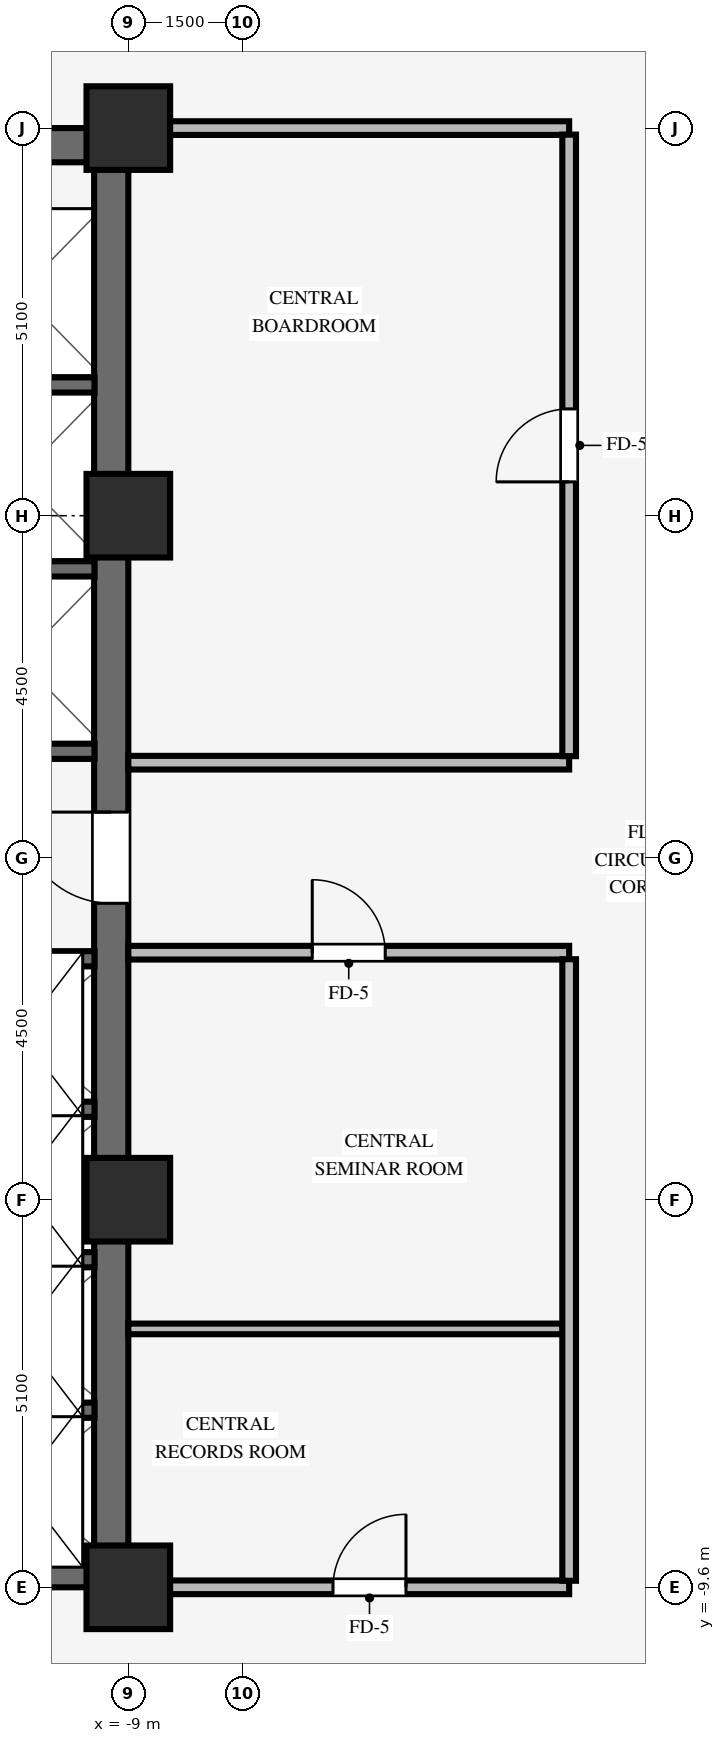
"""IFC4 building model, lengths in metres.
Left out: names, types, materials, properties, quantities, classifications, styles, units other than length and angle.
Written with IfcOpenShell. Run it as: python <this file> out.ifc"""

import sys

from ifc_helpers import new_model, si_unit, direction, frame, frame_2d, origin, origin_2d, place, context, subcontext, project, spatial, rectangle, extrude, source, transform, mapped, element, fill, save


model = new_model("IFC4")
c1 = context("Model", 3, precision=1e-05, world=origin(), true_north=direction((0.0, 1.0)))
c2 = subcontext(c1, "Body", "Model", "MODEL_VIEW")
j1 = project(units=[si_unit("LENGTHUNIT", "METRE"), si_unit("PLANEANGLEUNIT", "RADIAN")], contexts=[c1])
p1 = place(None, origin())
s1 = spatial("IfcSite", under=j1, at=p1, CompositionType="ELEMENT")
p2 = place(p1, origin())
s2 = spatial("IfcBuilding", under=s1, at=p2, CompositionType="ELEMENT")
p3 = place(p2, frame((0.0, 0.0, 56.8)))
s3 = spatial("IfcBuildingStorey", under=s2, at=p3, CompositionType="ELEMENT", Elevation=56.8)
for number, where, z_axis, x_axis in (
    (1, (-17.5, -9.375, 0.0), (0.0, 0.0, 1.0), (1.0, 0.0, 0.0)),
    (2, (-17.5, 9.375, 0.0), (0.0, 0.0, 1.0), (1.0, 0.0, 0.0)),
):
    element("IfcWall", number, at=place(p3, frame(where, z_axis=z_axis, x_axis=x_axis)), inside=s3, PredefinedType="SHEAR", context=c2, shape_type="SweptSolid", body=[
        extrude(rectangle(XDim=8.5, YDim=0.45, at=frame_2d((4.25, 0.0))), origin(), (0.0, 0.0, 1.0), 3.37),
    ])
p4 = place(p3, frame((-9.225, -9.155, 0.0), z_axis=(0.0, 0.0, 1.0), x_axis=(0.0, 1.0, 0.0)))
e3 = element("IfcWall", 3, at=p4, inside=s3, PredefinedType="SHEAR", context=c2, shape_type="SweptSolid", body=[
    extrude(rectangle(XDim=18.31, YDim=0.45, at=frame_2d((9.155, 0.0))), origin(), (0.0, 0.0, 1.0), 3.37),
])
p5 = place(p4, frame((8.555, 0.0, 0.0)))
e4 = element("IfcOpeningElement", 4, at=p5, cuts=e3, PredefinedType="OPENING", context=c2, shape_type="SweptSolid", body=[
    extrude(rectangle(XDim=1.2, YDim=2.15, at=frame_2d((0.6, 1.075))), frame((0.0, 0.235, 0.0), z_axis=(0.0, -1.0, 0.0), x_axis=(1.0, 0.0, 0.0)), (0.0, 0.0, 1.0), 0.47),
])
for number, where, z_axis, x_axis in (
    (5, (-9.0, -9.6, 0.0), (0.0, 0.0, 1.0), (1.0, 0.0, 0.0)),
    (6, (-9.0, -4.5, 0.0), (0.0, 0.0, 1.0), (1.0, 0.0, 0.0)),
    (7, (-9.0, 4.5, 0.0), (0.0, 0.0, 1.0), (1.0, 0.0, 0.0)),
    (8, (-9.0, 9.6, 0.0), (0.0, 0.0, 1.0), (1.0, 0.0, 0.0)),
):
    element("IfcColumn", number, at=place(p3, frame(where, z_axis=z_axis, x_axis=x_axis)), inside=s3, PredefinedType="COLUMN", context=c2, shape_type="SweptSolid", body=[
        extrude(rectangle(XDim=1.1, YDim=1.1, at=origin_2d()), origin(), (0.0, 0.0, 1.0), 3.37),
    ])
for number, where, z_axis, x_axis in (
    (9, (-11.505, -7.27, 0.0), (0.0, 0.0, 1.0), (1.0, 0.0, 0.0)),
    (10, (-11.505, -5.29, 0.0), (0.0, 0.0, 1.0), (1.0, 0.0, 0.0)),
    (11, (-11.505, -3.31, 0.0), (0.0, 0.0, 1.0), (1.0, 0.0, 0.0)),
    (12, (-11.505, -1.33, 0.0), (0.0, 0.0, 1.0), (1.0, 0.0, 0.0)),
    (13, (-11.505, 1.4, 0.0), (0.0, 0.0, 1.0), (1.0, 0.0, 0.0)),
    (14, (-11.505, 3.8, 0.0), (0.0, 0.0, 1.0), (1.0, 0.0, 0.0)),
    (15, (-11.505, 6.22, 0.0), (0.0, 0.0, 1.0), (1.0, 0.0, 0.0)),
):
    element("IfcWall", number, at=place(p3, frame(where, z_axis=z_axis, x_axis=x_axis)), inside=s3, PredefinedType="SHEAR", context=c2, shape_type="SweptSolid", body=[
        extrude(rectangle(XDim=2.06, YDim=0.2, at=frame_2d((1.03, 0.0))), origin(), (0.0, 0.0, 1.0), 3.37),
    ])
p6 = place(p3, frame((-8.454, -9.6, 0.0), z_axis=(0.0, 0.0, 1.0), x_axis=(1.0, 0.0, 0.0)))
e16 = element("IfcWall", 16, at=p6, inside=s3, PredefinedType="PARTITIONING", context=c2, shape_type="SweptSolid", body=[
    extrude(rectangle(XDim=5.254, YDim=0.18, at=frame_2d((2.627, 0.0))), origin(), (0.0, 0.0, 1.0), 2.405),
])
p7 = place(p6, frame((2.147, 0.0, 0.0)))
e17 = element("IfcOpeningElement", 17, at=p7, cuts=e16, PredefinedType="OPENING", context=c2, shape_type="SweptSolid", body=[
    extrude(rectangle(XDim=0.96, YDim=2.1, at=frame_2d((0.48, 1.05))), frame((0.0, 0.1, 0.0), z_axis=(0.0, -1.0, 0.0), x_axis=(1.0, 0.0, 0.0)), (0.0, 0.0, 1.0), 0.2),
])
p8 = place(p3, frame((-9.0, -6.2, 0.0), z_axis=(0.0, 0.0, 1.0), x_axis=(1.0, 0.0, 0.0)))
e18 = element("IfcWall", 18, at=p8, inside=s3, PredefinedType="PARTITIONING", context=c2, shape_type="SweptSolid", body=[
    extrude(rectangle(XDim=5.714, YDim=0.14, at=frame_2d((2.857, 0.0))), origin(), (0.0, 0.0, 1.0), 3.36),
])
p9 = place(p3, frame((-9.0, -1.25, 0.0), z_axis=(0.0, 0.0, 1.0), x_axis=(1.0, 0.0, 0.0)))
e19 = element("IfcWall", 19, at=p9, inside=s3, PredefinedType="PARTITIONING", context=c2, shape_type="SweptSolid", body=[
    extrude(rectangle(XDim=5.8, YDim=0.18, at=frame_2d((2.9, 0.0))), origin(), (0.0, 0.0, 1.0), 3.36),
])
p10 = place(p9, frame((2.42, 0.0, 0.0)))
e20 = element("IfcOpeningElement", 20, at=p10, cuts=e19, PredefinedType="OPENING", context=c2, shape_type="SweptSolid", body=[
    extrude(rectangle(XDim=0.96, YDim=2.1, at=frame_2d((0.48, 1.05))), frame((0.0, 0.1, 0.0), z_axis=(0.0, -1.0, 0.0), x_axis=(1.0, 0.0, 0.0)), (0.0, 0.0, 1.0), 0.2),
])
p11 = place(p3, frame((-9.0, 1.25, 0.0), z_axis=(0.0, 0.0, 1.0), x_axis=(1.0, 0.0, 0.0)))
e21 = element("IfcWall", 21, at=p11, inside=s3, PredefinedType="PARTITIONING", context=c2, shape_type="SweptSolid", body=[
    extrude(rectangle(XDim=5.8, YDim=0.18, at=frame_2d((2.9, 0.0))), origin(), (0.0, 0.0, 1.0), 3.36),
])
p12 = place(p3, frame((-8.454, 9.6, 0.0), z_axis=(0.0, 0.0, 1.0), x_axis=(1.0, 0.0, 0.0)))
e22 = element("IfcWall", 22, at=p12, inside=s3, PredefinedType="PARTITIONING", context=c2, shape_type="SweptSolid", body=[
    extrude(rectangle(XDim=5.254, YDim=0.18, at=frame_2d((2.627, 0.0))), origin(), (0.0, 0.0, 1.0), 2.405),
])
p13 = place(p3, frame((-3.2, -9.514, 0.0), z_axis=(0.0, 0.0, 1.0), x_axis=(0.0, 1.0, 0.0)))
e23 = element("IfcWall", 23, at=p13, inside=s3, PredefinedType="PARTITIONING", context=c2, shape_type="SweptSolid", body=[
    extrude(rectangle(XDim=8.178, YDim=0.18, at=frame_2d((4.089, 0.0))), origin(), (0.0, 0.0, 1.0), 3.36),
])
p14 = place(p3, frame((-3.2, 1.336, 0.0), z_axis=(0.0, 0.0, 1.0), x_axis=(0.0, 1.0, 0.0)))
e24 = element("IfcWall", 24, at=p14, inside=s3, PredefinedType="PARTITIONING", context=c2, shape_type="SweptSolid", body=[
    extrude(rectangle(XDim=8.178, YDim=0.18, at=frame_2d((4.089, 0.0))), origin(), (0.0, 0.0, 1.0), 3.36),
])
p15 = place(p14, frame((3.609, 0.0, 0.0)))
e25 = element("IfcOpeningElement", 25, at=p15, cuts=e24, PredefinedType="OPENING", context=c2, shape_type="SweptSolid", body=[
    extrude(rectangle(XDim=0.96, YDim=2.1, at=frame_2d((0.48, 1.05))), frame((0.0, 0.1, 0.0), z_axis=(0.0, -1.0, 0.0), x_axis=(1.0, 0.0, 0.0)), (0.0, 0.0, 1.0), 0.2),
])
m1 = source(origin(), c2, "Body", "SweptSolid", [
    extrude(rectangle(XDim=1.2, YDim=2.15, at=frame_2d((0.6, 1.075))), frame((0.0, 0.025, 0.0), z_axis=(0.0, -1.0, 0.0), x_axis=(1.0, 0.0, 0.0)), (0.0, 0.0, 1.0), 0.05),
])
p16 = place(p5, origin())
e26 = element("IfcDoor", 26, at=p16, inside=s3, OperationType="SINGLE_SWING_RIGHT", PredefinedType="DOOR", context=c2, shape_type="MappedRepresentation", body=[
    mapped(m1, transform((0.0, 0.0, 0.0), scale=1.0)),
])
fill(e4, e26)
m2 = source(origin(), c2, "Body", "SweptSolid", [
    extrude(rectangle(XDim=0.96, YDim=2.1, at=frame_2d((0.48, 1.05))), frame((0.0, 0.025, 0.0), z_axis=(0.0, -1.0, 0.0), x_axis=(1.0, 0.0, 0.0)), (0.0, 0.0, 1.0), 0.05),
])
p17 = place(p15, origin())
e27 = element("IfcDoor", 27, at=p17, inside=s3, OperationType="SINGLE_SWING_LEFT", PredefinedType="DOOR", context=c2, shape_type="MappedRepresentation", body=[
    mapped(m2, transform((0.0, 0.0, 0.0), scale=1.0)),
])
fill(e25, e27)
p18 = place(p10, origin())
e28 = element("IfcDoor", 28, at=p18, inside=s3, OperationType="SINGLE_SWING_LEFT", PredefinedType="DOOR", context=c2, shape_type="MappedRepresentation", body=[
    mapped(m2, transform((0.0, 0.0, 0.0), scale=1.0)),
])
fill(e20, e28)
p19 = place(p7, origin())
e29 = element("IfcDoor", 29, at=p19, inside=s3, OperationType="SINGLE_SWING_RIGHT", PredefinedType="DOOR", context=c2, shape_type="MappedRepresentation", body=[
    mapped(m2, transform((0.0, 0.0, 0.0), scale=1.0)),
])
fill(e17, e29)
save(model, sys.argv[1])
